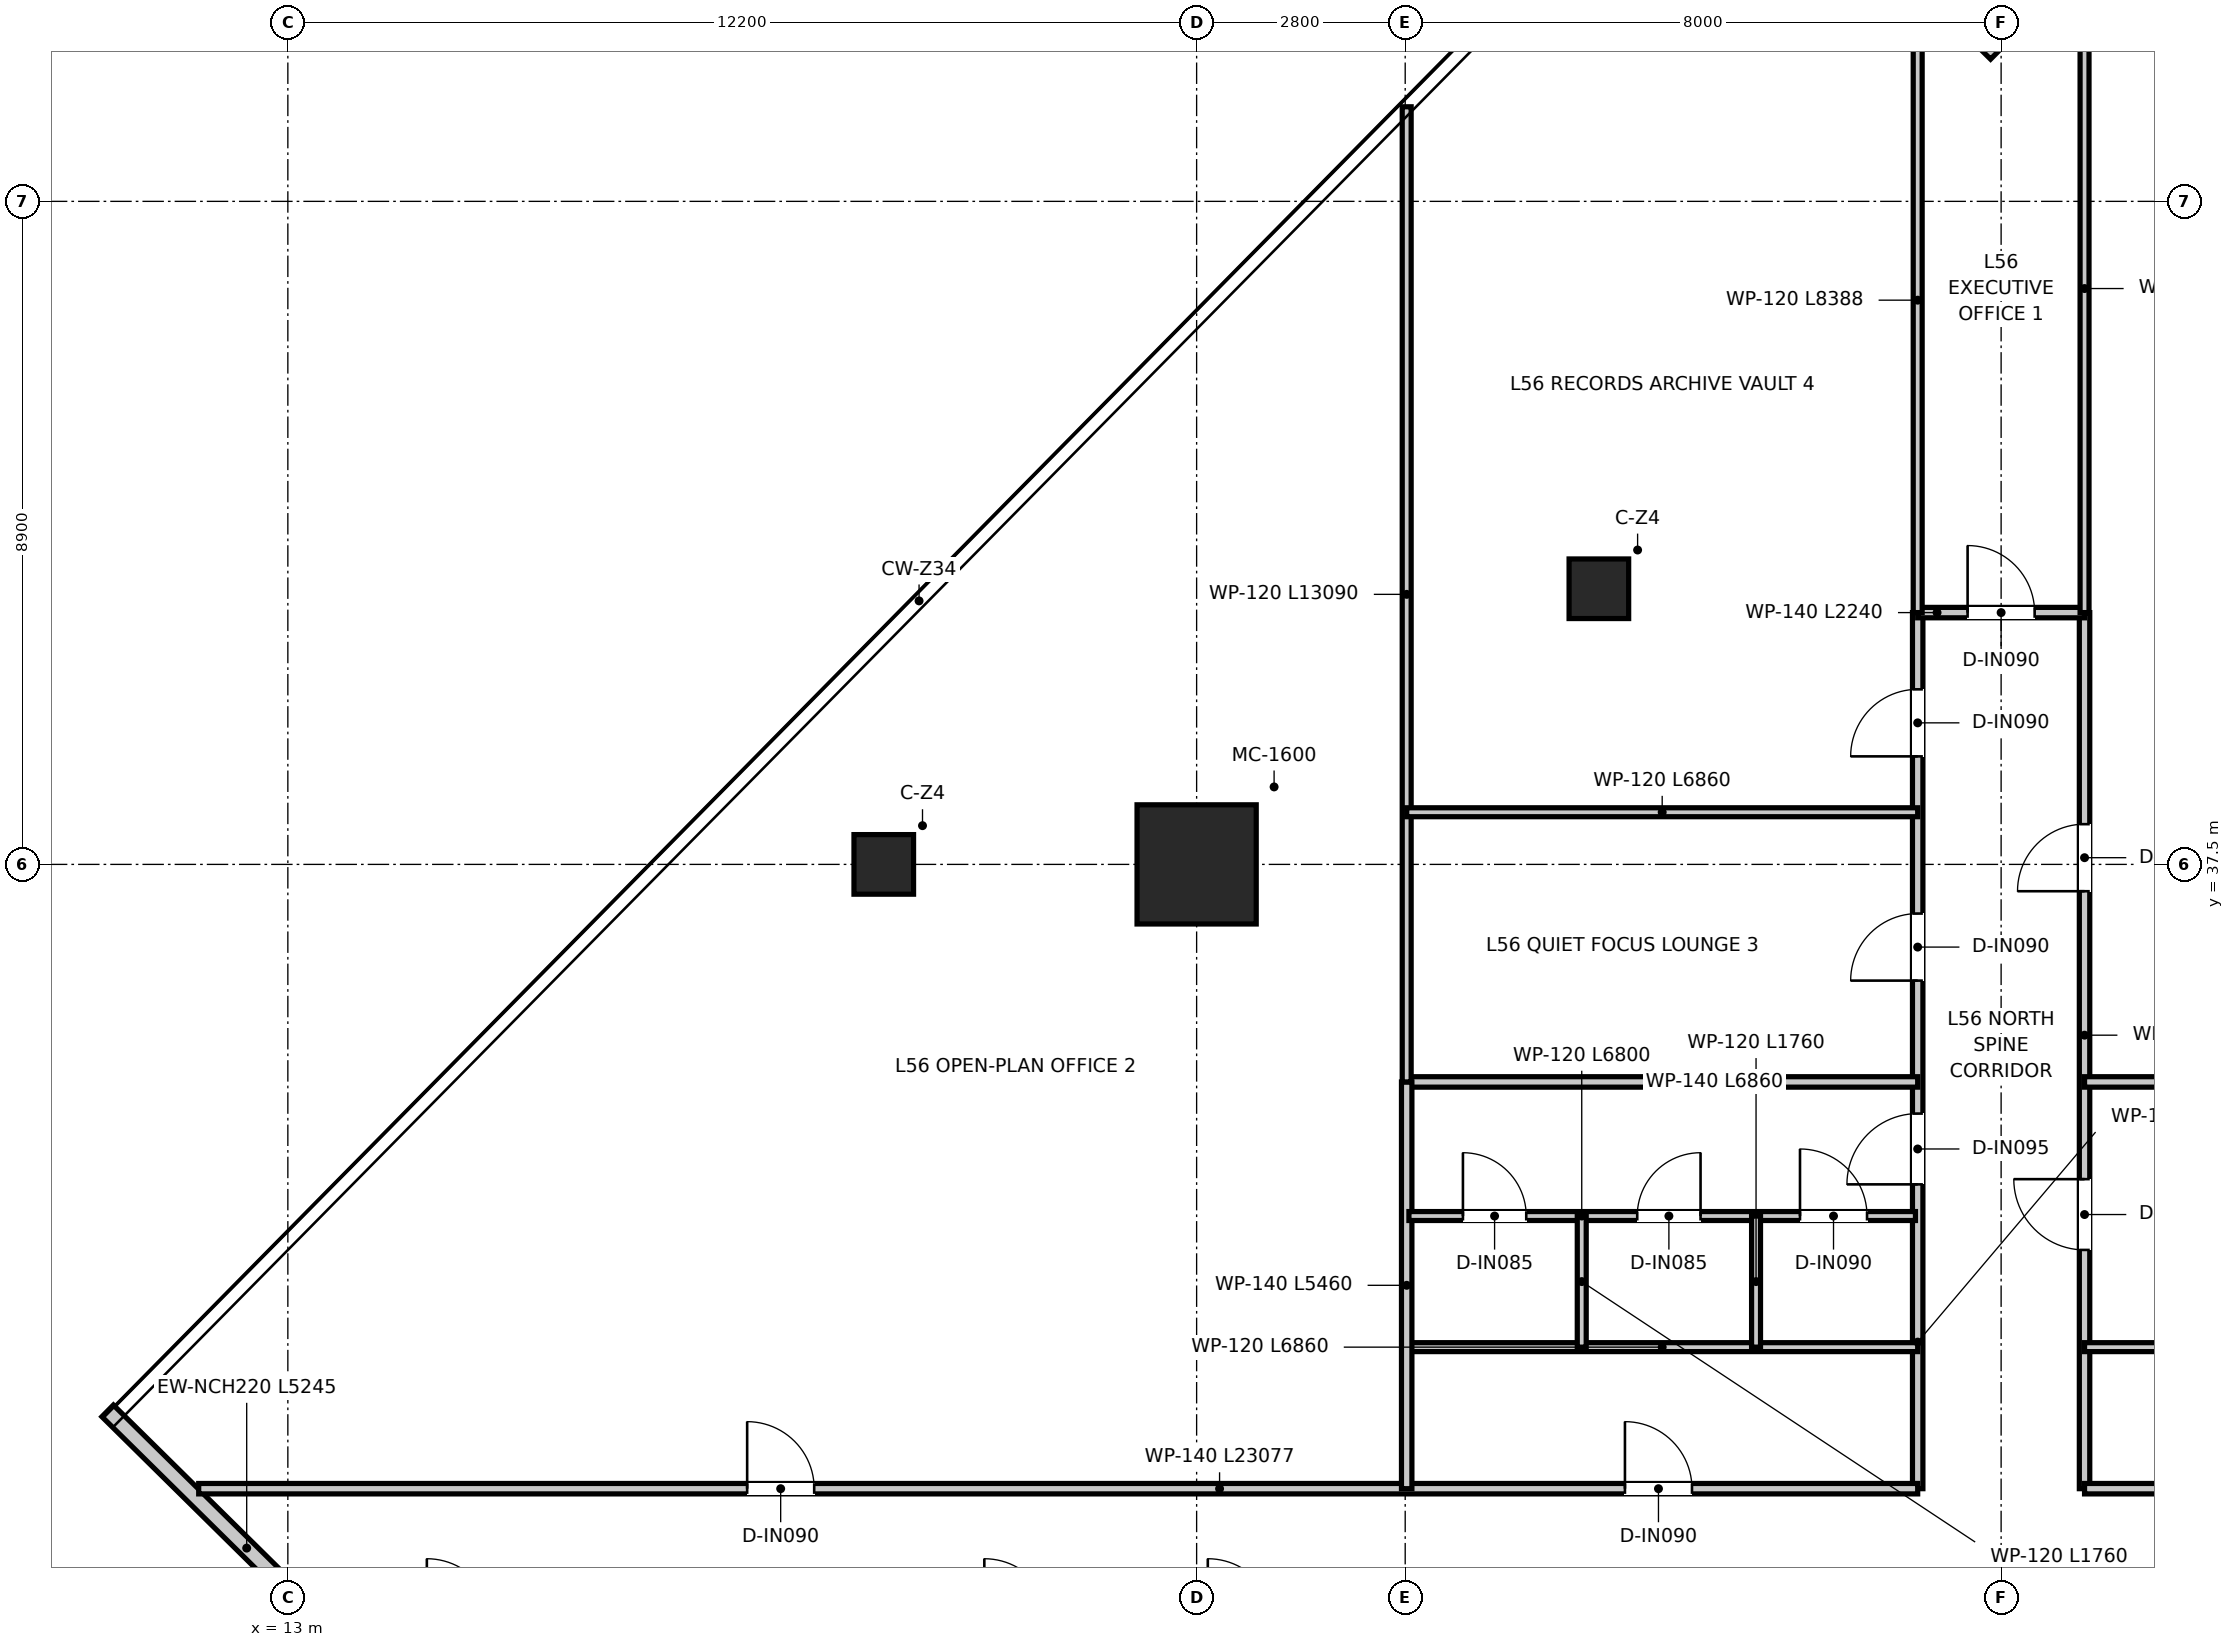
"""IFC4 building model, lengths in metres.
Left out: names, types, materials, properties, quantities, classifications, styles, units other than length and angle.
Written with IfcOpenShell. Run it as: python <this file> out.ifc"""

import sys

from ifc_helpers import new_model, si_unit, direction, frame, frame_2d, origin, origin_2d, place, context, subcontext, project, spatial, rectangle, extrude, source, transform, mapped, element, fill, save


model = new_model("IFC4")
c1 = context("Model", 3, precision=1e-05, world=origin(), true_north=direction((0.0, 1.0)))
c2 = subcontext(c1, "Body", "Model", "MODEL_VIEW")
j1 = project(units=[si_unit("LENGTHUNIT", "METRE"), si_unit("PLANEANGLEUNIT", "RADIAN")], contexts=[c1])
p1 = place(None, origin())
s1 = spatial("IfcSite", under=j1, at=p1, CompositionType="ELEMENT")
p2 = place(p1, origin())
s2 = spatial("IfcBuilding", under=s1, at=p2, CompositionType="ELEMENT")
p3 = place(p2, frame((0.0, 0.0, 231.0)))
s3 = spatial("IfcBuildingStorey", under=s2, at=p3, CompositionType="ELEMENT", Elevation=231.0)
m1 = source(origin(), c2, "Body", "SweptSolid", [
    extrude(rectangle(XDim=1.6, YDim=1.6, at=origin_2d()), origin(), (0.0, 0.0, 1.0), 3.95),
])
p4 = place(p3, frame((25.2, 37.5, 0.0), z_axis=(0.0, 0.0, 1.0), x_axis=(1.0, 0.0, 0.0)))
e1 = element("IfcColumn", 1, at=p4, inside=s3, PredefinedType="USERDEFINED", context=c2, shape_type="MappedRepresentation", body=[
    mapped(m1, transform((0.0, 0.0, 0.0), x_axis=(1.0, 0.0, 0.0), y_axis=(0.0, 1.0, 0.0), z_axis=(0.0, 0.0, 1.0), scale=1.0)),
])
m2 = source(origin(), c2, "Body", "SweptSolid", [
    extrude(rectangle(XDim=0.8, YDim=0.8, at=origin_2d()), origin(), (0.0, 0.0, 1.0), 3.95),
])
for number, where, z_axis, x_axis in (
    (2, (21.0, 37.5, 0.0), (0.0, 0.0, 1.0), (1.0, 0.0, 0.0)),
    (3, (30.6, 41.2, 0.0), (0.0, 0.0, 1.0), (1.0, 0.0, 0.0)),
):
    element("IfcColumn", number, at=place(p3, frame(where, z_axis=z_axis, x_axis=x_axis)), inside=s3, PredefinedType="COLUMN", context=c2, shape_type="MappedRepresentation", body=[
        mapped(m2, transform((0.0, 0.0, 0.0), x_axis=(1.0, 0.0, 0.0), y_axis=(0.0, 1.0, 0.0), z_axis=(0.0, 0.0, 1.0), scale=1.0)),
    ])
p5 = place(p3, frame((10.581, 30.165, 0.0), z_axis=(0.0, 0.0, 1.0), x_axis=(0.711699894533, -0.702483636906, 0.0)))
e4 = element("IfcWall", 4, at=p5, inside=s3, PredefinedType="ELEMENTEDWALL", context=c2, shape_type="SweptSolid", body=[
    extrude(rectangle(XDim=5.245, YDim=0.22, at=frame_2d((2.623, 0.0))), origin(), (0.0, 0.0, 1.0), 3.67),
])
p6 = place(p3, frame((39.465, 52.119, 0.0), z_axis=(0.0, 0.0, 1.0), x_axis=(-0.702460059039, -0.711723166305, 0.0)))
e5 = element("IfcWall", 5, at=p6, inside=s3, PredefinedType="ELEMENTEDWALL", context=c2, shape_type="SweptSolid", body=[
    extrude(rectangle(XDim=5.245, YDim=0.22, at=frame_2d((2.623, 0.0))), origin(), (0.0, 0.0, 1.0), 3.67),
])
p7 = place(p3, frame((34.88, 29.12, 0.0), z_axis=(0.0, 0.0, 1.0), x_axis=(0.0, 1.0, 0.0)))
e6 = element("IfcWall", 6, at=p7, inside=s3, PredefinedType="PARTITIONING", context=c2, shape_type="SweptSolid", body=[
    extrude(rectangle(XDim=11.76, YDim=0.14, at=frame_2d((5.88, 0.0))), origin(), (0.0, 0.0, 1.0), 3.03),
])
p8 = place(p7, frame((4.085, 0.0, 0.0)))
e7 = element("IfcOpeningElement", 7, at=p8, cuts=e6, PredefinedType="OPENING", context=c2, shape_type="SweptSolid", body=[
    extrude(rectangle(XDim=0.95, YDim=2.1, at=frame_2d((0.475, 1.05))), frame((0.0, 0.08, 0.0), z_axis=(0.0, -1.0, 0.0), x_axis=(1.0, 0.0, 0.0)), (0.0, 0.0, 1.0), 0.16),
])
p9 = place(p7, frame((6.82, 0.0, 0.0)))
e8 = element("IfcOpeningElement", 8, at=p9, cuts=e6, PredefinedType="OPENING", context=c2, shape_type="SweptSolid", body=[
    extrude(rectangle(XDim=0.9, YDim=2.1, at=frame_2d((0.45, 1.05))), frame((0.0, 0.08, 0.0), z_axis=(0.0, -1.0, 0.0), x_axis=(1.0, 0.0, 0.0)), (0.0, 0.0, 1.0), 0.16),
])
p10 = place(p7, frame((9.83, 0.0, 0.0)))
e9 = element("IfcOpeningElement", 9, at=p10, cuts=e6, PredefinedType="OPENING", context=c2, shape_type="SweptSolid", body=[
    extrude(rectangle(XDim=0.9, YDim=2.1, at=frame_2d((0.45, 1.05))), frame((0.0, 0.08, 0.0), z_axis=(0.0, -1.0, 0.0), x_axis=(1.0, 0.0, 0.0)), (0.0, 0.0, 1.0), 0.16),
])
p11 = place(p3, frame((37.12, 29.12, 0.0), z_axis=(0.0, 0.0, 1.0), x_axis=(0.0, 1.0, 0.0)))
e10 = element("IfcWall", 10, at=p11, inside=s3, PredefinedType="PARTITIONING", context=c2, shape_type="SweptSolid", body=[
    extrude(rectangle(XDim=11.76, YDim=0.14, at=frame_2d((5.88, 0.0))), origin(), (0.0, 0.0, 1.0), 3.03),
])
p12 = place(p11, frame((3.205, 0.0, 0.0)))
e11 = element("IfcOpeningElement", 11, at=p12, cuts=e10, PredefinedType="OPENING", context=c2, shape_type="SweptSolid", body=[
    extrude(rectangle(XDim=0.95, YDim=2.1, at=frame_2d((0.475, 1.05))), frame((0.0, 0.08, 0.0), z_axis=(0.0, -1.0, 0.0), x_axis=(1.0, 0.0, 0.0)), (0.0, 0.0, 1.0), 0.16),
])
p13 = place(p11, frame((8.02, 0.0, 0.0)))
e12 = element("IfcOpeningElement", 12, at=p13, cuts=e10, PredefinedType="OPENING", context=c2, shape_type="SweptSolid", body=[
    extrude(rectangle(XDim=0.9, YDim=2.1, at=frame_2d((0.45, 1.05))), frame((0.0, 0.08, 0.0), z_axis=(0.0, -1.0, 0.0), x_axis=(1.0, 0.0, 0.0)), (0.0, 0.0, 1.0), 0.16),
])
p14 = place(p3, frame((34.88, 40.88, 0.0), z_axis=(0.0, 0.0, 1.0), x_axis=(1.0, 0.0, 0.0)))
e13 = element("IfcWall", 13, at=p14, inside=s3, PredefinedType="PARTITIONING", context=c2, shape_type="SweptSolid", body=[
    extrude(rectangle(XDim=2.24, YDim=0.14, at=frame_2d((1.12, 0.0))), origin(), (0.0, 0.0, 1.0), 3.67),
])
p15 = place(p14, frame((0.67, 0.0, 0.0)))
e14 = element("IfcOpeningElement", 14, at=p15, cuts=e13, PredefinedType="OPENING", context=c2, shape_type="SweptSolid", body=[
    extrude(rectangle(XDim=0.9, YDim=2.1, at=frame_2d((0.45, 1.05))), frame((0.0, 0.08, 0.0), z_axis=(0.0, -1.0, 0.0), x_axis=(1.0, 0.0, 0.0)), (0.0, 0.0, 1.0), 0.16),
])
p16 = place(p3, frame((11.803, 29.12, 0.0), z_axis=(0.0, 0.0, 1.0), x_axis=(1.0, 0.0, 0.0)))
e15 = element("IfcWall", 15, at=p16, inside=s3, PredefinedType="PARTITIONING", context=c2, shape_type="SweptSolid", body=[
    extrude(rectangle(XDim=23.077, YDim=0.14, at=frame_2d((11.538, 0.0))), origin(), (0.0, 0.0, 1.0), 3.03),
])
p17 = place(p16, frame((19.147, 0.0, 0.0)))
e16 = element("IfcOpeningElement", 16, at=p17, cuts=e15, PredefinedType="OPENING", context=c2, shape_type="SweptSolid", body=[
    extrude(rectangle(XDim=0.9, YDim=2.1, at=frame_2d((0.45, 1.05))), frame((0.0, 0.08, 0.0), z_axis=(0.0, -1.0, 0.0), x_axis=(1.0, 0.0, 0.0)), (0.0, 0.0, 1.0), 0.16),
])
p18 = place(p16, frame((7.363, 0.0, 0.0)))
e17 = element("IfcOpeningElement", 17, at=p18, cuts=e15, PredefinedType="OPENING", context=c2, shape_type="SweptSolid", body=[
    extrude(rectangle(XDim=0.9, YDim=2.1, at=frame_2d((0.45, 1.05))), frame((0.0, 0.08, 0.0), z_axis=(0.0, -1.0, 0.0), x_axis=(1.0, 0.0, 0.0)), (0.0, 0.0, 1.0), 0.16),
])
p19 = place(p3, frame((37.12, 29.12, 0.0), z_axis=(0.0, 0.0, 1.0), x_axis=(1.0, 0.0, 0.0)))
e18 = element("IfcWall", 18, at=p19, inside=s3, PredefinedType="PARTITIONING", context=c2, shape_type="SweptSolid", body=[
    extrude(rectangle(XDim=22.73, YDim=0.14, at=frame_2d((11.365, 0.0))), origin(), (0.0, 0.0, 1.0), 3.03),
])
p20 = place(p19, frame((3.03, 0.0, 0.0)))
e19 = element("IfcOpeningElement", 19, at=p20, cuts=e18, PredefinedType="OPENING", context=c2, shape_type="SweptSolid", body=[
    extrude(rectangle(XDim=0.9, YDim=2.1, at=frame_2d((0.45, 1.05))), frame((0.0, 0.08, 0.0), z_axis=(0.0, -1.0, 0.0), x_axis=(1.0, 0.0, 0.0)), (0.0, 0.0, 1.0), 0.16),
])
p21 = place(p19, frame((14.604, 0.0, 0.0)))
e20 = element("IfcOpeningElement", 20, at=p21, cuts=e18, PredefinedType="OPENING", context=c2, shape_type="SweptSolid", body=[
    extrude(rectangle(XDim=0.9, YDim=2.1, at=frame_2d((0.45, 1.05))), frame((0.0, 0.08, 0.0), z_axis=(0.0, -1.0, 0.0), x_axis=(1.0, 0.0, 0.0)), (0.0, 0.0, 1.0), 0.16),
])
for number, where, z_axis, x_axis in (
    (21, (28.02, 31.02, 0.0), (0.0, 0.0, 1.0), (1.0, 0.0, 0.0)),
    (22, (37.12, 31.02, 0.0), (0.0, 0.0, 1.0), (1.0, 0.0, 0.0)),
):
    element("IfcWall", number, at=place(p3, frame(where, z_axis=z_axis, x_axis=x_axis)), inside=s3, PredefinedType="PARTITIONING", context=c2, shape_type="SweptSolid", body=[
        extrude(rectangle(XDim=6.86, YDim=0.12, at=frame_2d((3.43, 0.0))), origin(), (0.0, 0.0, 1.0), 3.18),
    ])
for number, where, z_axis, x_axis in (
    (23, (28.02, 34.58, 0.0), (0.0, 0.0, 1.0), (1.0, 0.0, 0.0)),
    (24, (37.12, 34.58, 0.0), (0.0, 0.0, 1.0), (1.0, 0.0, 0.0)),
):
    element("IfcWall", number, at=place(p3, frame(where, z_axis=z_axis, x_axis=x_axis)), inside=s3, PredefinedType="PARTITIONING", context=c2, shape_type="SweptSolid", body=[
        extrude(rectangle(XDim=6.86, YDim=0.14, at=frame_2d((3.43, 0.0))), origin(), (0.0, 0.0, 1.0), 3.18),
    ])
p22 = place(p3, frame((28.02, 29.12, 0.0), z_axis=(0.0, 0.0, 1.0), x_axis=(0.0, 1.0, 0.0)))
e25 = element("IfcWall", 25, at=p22, inside=s3, PredefinedType="PARTITIONING", context=c2, shape_type="SweptSolid", body=[
    extrude(rectangle(XDim=5.46, YDim=0.14, at=frame_2d((2.73, 0.0))), origin(), (0.0, 0.0, 1.0), 3.37),
])
p23 = place(p3, frame((28.05, 32.78, 0.0), z_axis=(0.0, 0.0, 1.0), x_axis=(1.0, 0.0, 0.0)))
e26 = element("IfcWall", 26, at=p23, inside=s3, PredefinedType="PARTITIONING", context=c2, shape_type="SweptSolid", body=[
    extrude(rectangle(XDim=6.8, YDim=0.12, at=frame_2d((3.4, 0.0))), origin(), (0.0, 0.0, 1.0), 3.18),
])
p24 = place(p23, frame((0.725, 0.0, 0.0)))
e27 = element("IfcOpeningElement", 27, at=p24, cuts=e26, PredefinedType="OPENING", context=c2, shape_type="SweptSolid", body=[
    extrude(rectangle(XDim=0.85, YDim=2.1, at=frame_2d((0.425, 1.05))), frame((0.0, 0.07, 0.0), z_axis=(0.0, -1.0, 0.0), x_axis=(1.0, 0.0, 0.0)), (0.0, 0.0, 1.0), 0.14),
])
p25 = place(p23, frame((3.065, 0.0, 0.0)))
e28 = element("IfcOpeningElement", 28, at=p25, cuts=e26, PredefinedType="OPENING", context=c2, shape_type="SweptSolid", body=[
    extrude(rectangle(XDim=0.85, YDim=2.1, at=frame_2d((0.425, 1.05))), frame((0.0, 0.07, 0.0), z_axis=(0.0, -1.0, 0.0), x_axis=(1.0, 0.0, 0.0)), (0.0, 0.0, 1.0), 0.14),
])
p26 = place(p23, frame((5.25, 0.0, 0.0)))
e29 = element("IfcOpeningElement", 29, at=p26, cuts=e26, PredefinedType="OPENING", context=c2, shape_type="SweptSolid", body=[
    extrude(rectangle(XDim=0.9, YDim=2.1, at=frame_2d((0.45, 1.05))), frame((0.0, 0.07, 0.0), z_axis=(0.0, -1.0, 0.0), x_axis=(1.0, 0.0, 0.0)), (0.0, 0.0, 1.0), 0.14),
])
p27 = place(p3, frame((30.37, 31.02, 0.0), z_axis=(0.0, 0.0, 1.0), x_axis=(0.0, 1.0, 0.0)))
e30 = element("IfcWall", 30, at=p27, inside=s3, PredefinedType="PARTITIONING", context=c2, shape_type="SweptSolid", body=[
    extrude(rectangle(XDim=1.76, YDim=0.12, at=frame_2d((0.88, 0.0))), origin(), (0.0, 0.0, 1.0), 3.18),
])
p28 = place(p3, frame((32.71, 31.02, 0.0), z_axis=(0.0, 0.0, 1.0), x_axis=(0.0, 1.0, 0.0)))
e31 = element("IfcWall", 31, at=p28, inside=s3, PredefinedType="PARTITIONING", context=c2, shape_type="SweptSolid", body=[
    extrude(rectangle(XDim=1.76, YDim=0.12, at=frame_2d((0.88, 0.0))), origin(), (0.0, 0.0, 1.0), 3.67),
])
p29 = place(p3, frame((34.88, 40.88, 0.0), z_axis=(0.0, 0.0, 1.0), x_axis=(0.0, 1.0, 0.0)))
e32 = element("IfcWall", 32, at=p29, inside=s3, PredefinedType="PARTITIONING", context=c2, shape_type="SweptSolid", body=[
    extrude(rectangle(XDim=8.388, YDim=0.12, at=frame_2d((4.194, 0.0))), origin(), (0.0, 0.0, 1.0), 3.28),
])
p30 = place(p3, frame((37.12, 40.88, 0.0), z_axis=(0.0, 0.0, 1.0), x_axis=(0.0, 1.0, 0.0)))
e33 = element("IfcWall", 33, at=p30, inside=s3, PredefinedType="PARTITIONING", context=c2, shape_type="SweptSolid", body=[
    extrude(rectangle(XDim=8.7, YDim=0.12, at=frame_2d((4.35, 0.0))), origin(), (0.0, 0.0, 1.0), 3.28),
])
p31 = place(p3, frame((28.02, 34.58, 0.0), z_axis=(0.0, 0.0, 1.0), x_axis=(0.0, 1.0, 0.0)))
e34 = element("IfcWall", 34, at=p31, inside=s3, PredefinedType="PARTITIONING", context=c2, shape_type="SweptSolid", body=[
    extrude(rectangle(XDim=13.09, YDim=0.12, at=frame_2d((6.545, 0.0))), origin(), (0.0, 0.0, 1.0), 3.03),
])
p32 = place(p3, frame((28.02, 38.2, 0.0), z_axis=(0.0, 0.0, 1.0), x_axis=(1.0, 0.0, 0.0)))
e35 = element("IfcWall", 35, at=p32, inside=s3, PredefinedType="PARTITIONING", context=c2, shape_type="SweptSolid", body=[
    extrude(rectangle(XDim=6.86, YDim=0.12, at=frame_2d((3.43, 0.0))), origin(), (0.0, 0.0, 1.0), 3.18),
])
p33 = place(p17, origin())
e36 = element("IfcDoor", 36, at=p33, inside=s3, OperationType="SINGLE_SWING_LEFT", PredefinedType="DOOR", context=c2, shape_type="SweptSolid", body=[
    extrude(rectangle(XDim=0.9, YDim=2.1, at=frame_2d((0.45, 1.05))), frame((0.0, 0.025, 0.0), z_axis=(0.0, -1.0, 0.0), x_axis=(1.0, 0.0, 0.0)), (0.0, 0.0, 1.0), 0.05),
])
fill(e16, e36)
p34 = place(p8, origin())
e37 = element("IfcDoor", 37, at=p34, inside=s3, OperationType="SINGLE_SWING_LEFT", PredefinedType="DOOR", context=c2, shape_type="SweptSolid", body=[
    extrude(rectangle(XDim=0.95, YDim=2.1, at=frame_2d((0.475, 1.05))), frame((0.0, 0.025, 0.0), z_axis=(0.0, -1.0, 0.0), x_axis=(1.0, 0.0, 0.0)), (0.0, 0.0, 1.0), 0.05),
])
fill(e7, e37)
p35 = place(p12, origin())
e38 = element("IfcDoor", 38, at=p35, inside=s3, OperationType="SINGLE_SWING_RIGHT", PredefinedType="DOOR", context=c2, shape_type="SweptSolid", body=[
    extrude(rectangle(XDim=0.95, YDim=2.1, at=frame_2d((0.475, 1.05))), frame((0.0, 0.025, 0.0), z_axis=(0.0, -1.0, 0.0), x_axis=(1.0, 0.0, 0.0)), (0.0, 0.0, 1.0), 0.05),
])
fill(e11, e38)
p36 = place(p24, origin())
e39 = element("IfcDoor", 39, at=p36, inside=s3, OperationType="SINGLE_SWING_LEFT", PredefinedType="DOOR", context=c2, shape_type="SweptSolid", body=[
    extrude(rectangle(XDim=0.85, YDim=2.1, at=frame_2d((0.425, 1.05))), frame((0.0, 0.025, 0.0), z_axis=(0.0, -1.0, 0.0), x_axis=(1.0, 0.0, 0.0)), (0.0, 0.0, 1.0), 0.05),
])
fill(e27, e39)
p37 = place(p25, origin())
e40 = element("IfcDoor", 40, at=p37, inside=s3, OperationType="SINGLE_SWING_RIGHT", PredefinedType="DOOR", context=c2, shape_type="SweptSolid", body=[
    extrude(rectangle(XDim=0.85, YDim=2.1, at=frame_2d((0.425, 1.05))), frame((0.0, 0.025, 0.0), z_axis=(0.0, -1.0, 0.0), x_axis=(1.0, 0.0, 0.0)), (0.0, 0.0, 1.0), 0.05),
])
fill(e28, e40)
p38 = place(p26, origin())
e41 = element("IfcDoor", 41, at=p38, inside=s3, OperationType="SINGLE_SWING_LEFT", PredefinedType="DOOR", context=c2, shape_type="SweptSolid", body=[
    extrude(rectangle(XDim=0.9, YDim=2.1, at=frame_2d((0.45, 1.05))), frame((0.0, 0.025, 0.0), z_axis=(0.0, -1.0, 0.0), x_axis=(1.0, 0.0, 0.0)), (0.0, 0.0, 1.0), 0.05),
])
fill(e29, e41)
p39 = place(p15, origin())
e42 = element("IfcDoor", 42, at=p39, inside=s3, OperationType="SINGLE_SWING_LEFT", PredefinedType="DOOR", context=c2, shape_type="SweptSolid", body=[
    extrude(rectangle(XDim=0.9, YDim=2.1, at=frame_2d((0.45, 1.05))), frame((0.0, 0.025, 0.0), z_axis=(0.0, -1.0, 0.0), x_axis=(1.0, 0.0, 0.0)), (0.0, 0.0, 1.0), 0.05),
])
fill(e14, e42)
p40 = place(p18, origin())
e43 = element("IfcDoor", 43, at=p40, inside=s3, OperationType="SINGLE_SWING_LEFT", PredefinedType="DOOR", context=c2, shape_type="SweptSolid", body=[
    extrude(rectangle(XDim=0.9, YDim=2.1, at=frame_2d((0.45, 1.05))), frame((0.0, 0.025, 0.0), z_axis=(0.0, -1.0, 0.0), x_axis=(1.0, 0.0, 0.0)), (0.0, 0.0, 1.0), 0.05),
])
fill(e17, e43)
p41 = place(p9, origin())
e44 = element("IfcDoor", 44, at=p41, inside=s3, OperationType="SINGLE_SWING_LEFT", PredefinedType="DOOR", context=c2, shape_type="SweptSolid", body=[
    extrude(rectangle(XDim=0.9, YDim=2.1, at=frame_2d((0.45, 1.05))), frame((0.0, 0.025, 0.0), z_axis=(0.0, -1.0, 0.0), x_axis=(1.0, 0.0, 0.0)), (0.0, 0.0, 1.0), 0.05),
])
fill(e8, e44)
p42 = place(p10, origin())
e45 = element("IfcDoor", 45, at=p42, inside=s3, OperationType="SINGLE_SWING_LEFT", PredefinedType="DOOR", context=c2, shape_type="SweptSolid", body=[
    extrude(rectangle(XDim=0.9, YDim=2.1, at=frame_2d((0.45, 1.05))), frame((0.0, 0.025, 0.0), z_axis=(0.0, -1.0, 0.0), x_axis=(1.0, 0.0, 0.0)), (0.0, 0.0, 1.0), 0.05),
])
fill(e9, e45)
p43 = place(p13, origin())
e46 = element("IfcDoor", 46, at=p43, inside=s3, OperationType="SINGLE_SWING_LEFT", PredefinedType="DOOR", context=c2, shape_type="SweptSolid", body=[
    extrude(rectangle(XDim=0.9, YDim=2.1, at=frame_2d((0.45, 1.05))), frame((0.0, 0.025, 0.0), z_axis=(0.0, -1.0, 0.0), x_axis=(1.0, 0.0, 0.0)), (0.0, 0.0, 1.0), 0.05),
])
fill(e12, e46)
save(model, sys.argv[1])
